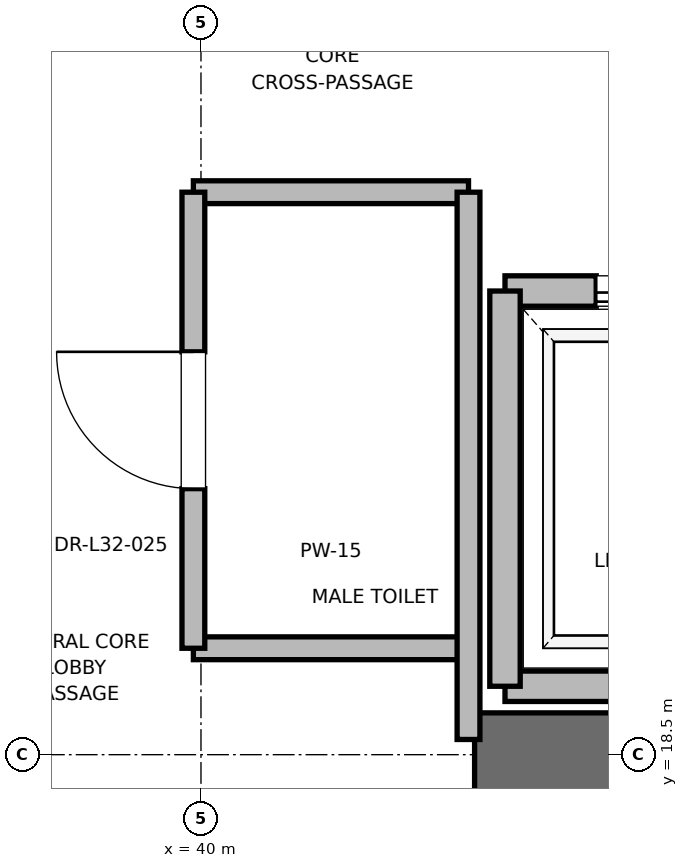
"""IFC4 building model, lengths in metres.
Left out: names, types, materials, properties, quantities, classifications, styles, units other than length and angle.
Written with IfcOpenShell. Run it as: python <this file> out.ifc"""

import sys

from ifc_helpers import new_model, si_unit, direction, frame, frame_2d, origin, place, context, subcontext, project, spatial, rectangle, extrude, element, fill, save


model = new_model("IFC4")
c1 = context("Model", 3, precision=1e-05, world=origin(), true_north=direction((0.0, 1.0)))
c2 = subcontext(c1, "Body", "Model", "MODEL_VIEW")
j1 = project(units=[si_unit("LENGTHUNIT", "METRE"), si_unit("PLANEANGLEUNIT", "RADIAN")], contexts=[c1])
p1 = place(None, origin())
s1 = spatial("IfcSite", under=j1, at=p1, CompositionType="ELEMENT")
p2 = place(p1, origin())
s2 = spatial("IfcBuilding", under=s1, at=p2, CompositionType="ELEMENT")
p3 = place(p2, frame((0.0, 0.0, 140.4)))
s3 = spatial("IfcBuildingStorey", under=s2, at=p3, CompositionType="ELEMENT", Elevation=140.4)
p4 = place(p3, frame((41.8, 18.5, 0.0), z_axis=(0.0, 0.0, 1.0), x_axis=(1.0, 0.0, 0.0)))
e1 = element("IfcWall", 1, at=p4, inside=s3, PredefinedType="SHEAR", context=c2, shape_type="SweptSolid", body=[
    extrude(rectangle(XDim=9.2, YDim=0.55, at=frame_2d((4.6, 0.0))), origin(), (0.0, 0.0, 1.0), 3.775),
])
p5 = place(p3, frame((42.0, 18.95, 0.0), z_axis=(0.0, 0.0, 1.0), x_axis=(1.0, 0.0, 0.0)))
e2 = element("IfcWall", 2, at=p5, inside=s3, PredefinedType="SOLIDWALL", context=c2, shape_type="SweptSolid", body=[
    extrude(rectangle(XDim=2.3, YDim=0.2, at=frame_2d((1.15, 0.0))), origin(), (0.0, 0.0, 1.0), 2.755),
])
p6 = place(p3, frame((44.3, 21.55, 0.0), z_axis=(0.0, 0.0, 1.0), x_axis=(-1.0, 0.0, 0.0)))
e3 = element("IfcWall", 3, at=p6, inside=s3, PredefinedType="SOLIDWALL", context=c2, shape_type="SweptSolid", body=[
    extrude(rectangle(XDim=2.3, YDim=0.2, at=frame_2d((1.15, 0.0))), origin(), (0.0, 0.0, 1.0), 3.775),
])
p7 = place(p6, frame((0.6, 0.0, 0.0)))
e4 = element("IfcOpeningElement", 4, at=p7, cuts=e3, PredefinedType="OPENING", context=c2, shape_type="SweptSolid", body=[
    extrude(rectangle(XDim=1.1, YDim=2.2, at=frame_2d((0.55, 1.1))), frame((0.0, 0.1, 0.0), z_axis=(0.0, -1.0, 0.0), x_axis=(1.0, 0.0, 0.0)), (0.0, 0.0, 1.0), 0.2),
])
p8 = place(p3, frame((42.0, 21.55, 0.0), z_axis=(0.0, 0.0, 1.0), x_axis=(0.0, -1.0, 0.0)))
e5 = element("IfcWall", 5, at=p8, inside=s3, PredefinedType="SOLIDWALL", context=c2, shape_type="SweptSolid", body=[
    extrude(rectangle(XDim=2.6, YDim=0.2, at=frame_2d((1.3, 0.0))), origin(), (0.0, 0.0, 1.0), 2.755),
])
for number, where, z_axis, x_axis in (
    (6, (39.95, 19.2, 0.0), (0.0, 0.0, 1.0), (1.0, 0.0, 0.0)),
    (7, (39.95, 22.2, 0.0), (0.0, 0.0, 1.0), (1.0, 0.0, 0.0)),
):
    element("IfcWall", number, at=place(p3, frame(where, z_axis=z_axis, x_axis=x_axis)), inside=s3, PredefinedType="PARTITIONING", context=c2, shape_type="SweptSolid", body=[
        extrude(rectangle(XDim=1.81, YDim=0.15, at=frame_2d((0.905, 0.0))), origin(), (0.0, 0.0, 1.0), 2.85),
    ])
p9 = place(p3, frame((41.76, 18.6, 0.0), z_axis=(0.0, 0.0, 1.0), x_axis=(0.0, 1.0, 0.0)))
e8 = element("IfcWall", 8, at=p9, inside=s3, PredefinedType="PARTITIONING", context=c2, shape_type="SweptSolid", body=[
    extrude(rectangle(XDim=3.6, YDim=0.15, at=frame_2d((1.8, 0.0))), origin(), (0.0, 0.0, 1.0), 2.755),
])
p10 = place(p3, frame((39.95, 19.2, 0.0), z_axis=(0.0, 0.0, 1.0), x_axis=(0.0, 1.0, 0.0)))
e9 = element("IfcWall", 9, at=p10, inside=s3, PredefinedType="PARTITIONING", context=c2, shape_type="SweptSolid", body=[
    extrude(rectangle(XDim=3.0, YDim=0.15, at=frame_2d((1.5, 0.0))), origin(), (0.0, 0.0, 1.0), 2.85),
])
p11 = place(p10, frame((1.05, 0.0, 0.0)))
e10 = element("IfcOpeningElement", 10, at=p11, cuts=e9, PredefinedType="OPENING", context=c2, shape_type="SweptSolid", body=[
    extrude(rectangle(XDim=0.9, YDim=2.1, at=frame_2d((0.45, 1.05))), frame((0.0, 0.075, 0.0), z_axis=(0.0, -1.0, 0.0), x_axis=(1.0, 0.0, 0.0)), (0.0, 0.0, 1.0), 0.15),
])
p12 = place(p7, origin())
e11 = element("IfcDoor", 11, at=p12, inside=s3, OperationType="SLIDING_TO_RIGHT", PredefinedType="DOOR", context=c2, shape_type="SweptSolid", body=[
    extrude(rectangle(XDim=1.1, YDim=2.2, at=frame_2d((0.55, 1.1))), frame((0.0, 0.025, 0.0), z_axis=(0.0, -1.0, 0.0), x_axis=(1.0, 0.0, 0.0)), (0.0, 0.0, 1.0), 0.05),
])
fill(e4, e11)
p13 = place(p11, origin())
e12 = element("IfcDoor", 12, at=p13, inside=s3, OperationType="SINGLE_SWING_RIGHT", PredefinedType="DOOR", context=c2, shape_type="SweptSolid", body=[
    extrude(rectangle(XDim=0.9, YDim=2.1, at=frame_2d((0.45, 1.05))), frame((0.0, 0.025, 0.0), z_axis=(0.0, -1.0, 0.0), x_axis=(1.0, 0.0, 0.0)), (0.0, 0.0, 1.0), 0.05),
])
fill(e10, e12)
save(model, sys.argv[1])
